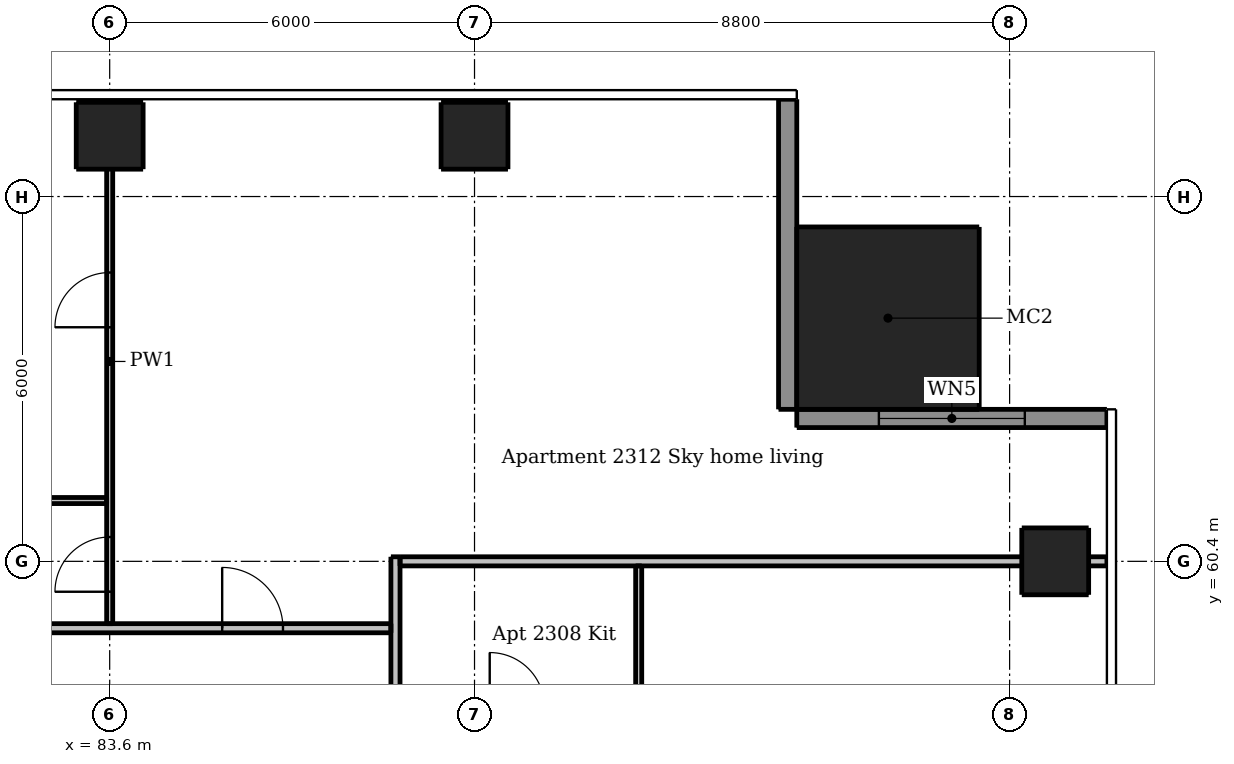
"""IFC4 building model, lengths in metres.
Left out: names, types, materials, properties, quantities, classifications, styles, units other than length and angle.
Written with IfcOpenShell. Run it as: python <this file> out.ifc"""

import sys

from ifc_helpers import new_model, si_unit, direction, frame, frame_2d, origin, origin_2d, place, context, subcontext, project, spatial, rectangle, extrude, element, fill, save


model = new_model("IFC4")
c1 = context("Model", 3, precision=1e-05, world=origin(), true_north=direction((0.0, 1.0)))
c2 = subcontext(c1, "Body", "Model", "MODEL_VIEW")
j1 = project(units=[si_unit("LENGTHUNIT", "METRE"), si_unit("PLANEANGLEUNIT", "RADIAN")], contexts=[c1])
p1 = place(None, origin())
s1 = spatial("IfcSite", under=j1, at=p1, CompositionType="ELEMENT")
p2 = place(p1, origin())
s2 = spatial("IfcBuilding", under=s1, at=p2, CompositionType="ELEMENT")
p3 = place(p2, frame((0.0, 0.0, 88.6)))
s3 = spatial("IfcBuildingStorey", under=s2, at=p3, CompositionType="ELEMENT", Elevation=88.6)
for number, where, z_axis, x_axis in (
    (1, (99.15, 60.4, 0.0), (0.0, 0.0, 1.0), (1.0, 0.0, 0.0)),
    (2, (83.6, 67.4, 0.0), (0.0, 0.0, 1.0), (1.0, 0.0, 0.0)),
    (3, (89.6, 67.4, 0.0), (0.0, 0.0, 1.0), (1.0, 0.0, 0.0)),
):
    element("IfcColumn", number, at=place(p3, frame(where, z_axis=z_axis, x_axis=x_axis)), inside=s3, PredefinedType="COLUMN", context=c2, shape_type="SweptSolid", body=[
        extrude(rectangle(XDim=1.1, YDim=1.1, at=origin_2d()), origin(), (0.0, 0.0, 1.0), 3.05),
    ])
p4 = place(p3, frame((96.4, 64.4, 0.0), z_axis=(0.0, 0.0, 1.0), x_axis=(1.0, 0.0, 0.0)))
e4 = element("IfcColumn", 4, at=p4, inside=s3, PredefinedType="COLUMN", context=c2, shape_type="SweptSolid", body=[
    extrude(rectangle(XDim=3.0, YDim=3.0, at=origin_2d()), origin(), (0.0, 0.0, 1.0), 3.3),
])
p5 = place(p3, frame((100.0, 62.75, 0.0), z_axis=(0.0, 0.0, 1.0), x_axis=(-1.0, 0.0, 0.0)))
e5 = element("IfcWall", 5, at=p5, inside=s3, PredefinedType="SOLIDWALL", context=c2, shape_type="SweptSolid", body=[
    extrude(rectangle(XDim=5.1, YDim=0.3, at=frame_2d((2.55, 0.0))), origin(), (0.0, 0.0, 1.0), 3.05),
])
p6 = place(p5, frame((1.35, 0.0, 0.15)))
e6 = element("IfcOpeningElement", 6, at=p6, cuts=e5, PredefinedType="OPENING", context=c2, shape_type="SweptSolid", body=[
    extrude(rectangle(XDim=2.4, YDim=2.1, at=frame_2d((1.2, 1.05))), frame((0.0, 0.16, 0.0), z_axis=(0.0, -1.0, 0.0), x_axis=(1.0, 0.0, 0.0)), (0.0, 0.0, 1.0), 0.32),
])
p7 = place(p3, frame((94.75, 62.9, 0.0), z_axis=(0.0, 0.0, 1.0), x_axis=(0.0, 1.0, 0.0)))
e7 = element("IfcWall", 7, at=p7, inside=s3, PredefinedType="SOLIDWALL", context=c2, shape_type="SweptSolid", body=[
    extrude(rectangle(XDim=5.1, YDim=0.3, at=frame_2d((2.55, 0.0))), origin(), (0.0, 0.0, 1.0), 3.05),
])
p8 = place(p3, frame((83.6, 59.375, 0.0), z_axis=(0.0, 0.0, 1.0), x_axis=(0.0, 1.0, 0.0)))
e8 = element("IfcWall", 8, at=p8, inside=s3, PredefinedType="PARTITIONING", context=c2, shape_type="SweptSolid", body=[
    extrude(rectangle(XDim=8.625, YDim=0.1, at=frame_2d((4.312, 0.0))), origin(), (0.0, 0.0, 1.0), 2.516),
])
p9 = place(p8, frame((0.525, 0.0, 0.0)))
e9 = element("IfcOpeningElement", 9, at=p9, cuts=e8, PredefinedType="OPENING", context=c2, shape_type="SweptSolid", body=[
    extrude(rectangle(XDim=0.9, YDim=2.1, at=frame_2d((0.45, 1.05))), frame((0.0, 0.06, 0.0), z_axis=(0.0, -1.0, 0.0), x_axis=(1.0, 0.0, 0.0)), (0.0, 0.0, 1.0), 0.12),
])
p10 = place(p8, frame((4.875, 0.0, 0.0)))
e10 = element("IfcOpeningElement", 10, at=p10, cuts=e8, PredefinedType="OPENING", context=c2, shape_type="SweptSolid", body=[
    extrude(rectangle(XDim=0.9, YDim=2.1, at=frame_2d((0.45, 1.05))), frame((0.0, 0.06, 0.0), z_axis=(0.0, -1.0, 0.0), x_axis=(1.0, 0.0, 0.0)), (0.0, 0.0, 1.0), 0.12),
])
p11 = place(p3, frame((92.3, 57.95, 0.0), z_axis=(0.0, 0.0, 1.0), x_axis=(0.0, 1.0, 0.0)))
e11 = element("IfcWall", 11, at=p11, inside=s3, PredefinedType="PARTITIONING", context=c2, shape_type="SweptSolid", body=[
    extrude(rectangle(XDim=2.375, YDim=0.1, at=frame_2d((1.188, 0.0))), origin(), (0.0, 0.0, 1.0), 3.05),
])
p12 = place(p3, frame((83.55, 61.4, 0.0), z_axis=(0.0, 0.0, 1.0), x_axis=(-1.0, 0.0, 0.0)))
e12 = element("IfcWall", 12, at=p12, inside=s3, PredefinedType="PARTITIONING", context=c2, shape_type="SweptSolid", body=[
    extrude(rectangle(XDim=8.0, YDim=0.1, at=frame_2d((4.0, 0.0))), origin(), (0.0, 0.0, 1.0), 3.05),
])
p13 = place(p12, frame((6.6, 0.0, 0.0)))
e13 = element("IfcOpeningElement", 13, at=p13, cuts=e12, PredefinedType="OPENING", context=c2, shape_type="SweptSolid", body=[
    extrude(rectangle(XDim=0.8, YDim=2.1, at=frame_2d((0.4, 1.05))), frame((0.0, 0.06, 0.0), z_axis=(0.0, -1.0, 0.0), x_axis=(1.0, 0.0, 0.0)), (0.0, 0.0, 1.0), 0.12),
])
p14 = place(p12, frame((3.75, 0.0, 0.0)))
e14 = element("IfcOpeningElement", 14, at=p14, cuts=e12, PredefinedType="OPENING", context=c2, shape_type="SweptSolid", body=[
    extrude(rectangle(XDim=0.8, YDim=2.1, at=frame_2d((0.4, 1.05))), frame((0.0, 0.06, 0.0), z_axis=(0.0, -1.0, 0.0), x_axis=(1.0, 0.0, 0.0)), (0.0, 0.0, 1.0), 0.12),
])
p15 = place(p3, frame((88.3, 60.475, 0.0), z_axis=(0.0, 0.0, 1.0), x_axis=(0.0, -1.0, 0.0)))
e15 = element("IfcWall", 15, at=p15, inside=s3, PredefinedType="PARTITIONING", context=c2, shape_type="SweptSolid", body=[
    extrude(rectangle(XDim=28.7, YDim=0.15, at=frame_2d((14.35, 0.0))), origin(), (0.0, 0.0, 1.0), 3.05),
])
p16 = place(p15, frame((27.425, 0.0, 0.0)))
e16 = element("IfcOpeningElement", 16, at=p16, cuts=e15, PredefinedType="OPENING", context=c2, shape_type="SweptSolid", body=[
    extrude(rectangle(XDim=1.0, YDim=2.1, at=frame_2d((0.5, 1.05))), frame((0.0, 0.085, 0.0), z_axis=(0.0, -1.0, 0.0), x_axis=(1.0, 0.0, 0.0)), (0.0, 0.0, 1.0), 0.17),
])
p17 = place(p15, frame((17.575, 0.0, 0.0)))
e17 = element("IfcOpeningElement", 17, at=p17, cuts=e15, PredefinedType="OPENING", context=c2, shape_type="SweptSolid", body=[
    extrude(rectangle(XDim=1.0, YDim=2.1, at=frame_2d((0.5, 1.05))), frame((0.0, 0.085, 0.0), z_axis=(0.0, -1.0, 0.0), x_axis=(1.0, 0.0, 0.0)), (0.0, 0.0, 1.0), 0.17),
])
p18 = place(p15, frame((11.575, 0.0, 0.0)))
e18 = element("IfcOpeningElement", 18, at=p18, cuts=e15, PredefinedType="OPENING", context=c2, shape_type="SweptSolid", body=[
    extrude(rectangle(XDim=1.0, YDim=2.1, at=frame_2d((0.5, 1.05))), frame((0.0, 0.085, 0.0), z_axis=(0.0, -1.0, 0.0), x_axis=(1.0, 0.0, 0.0)), (0.0, 0.0, 1.0), 0.17),
])
p19 = place(p15, frame((3.775, 0.0, 0.0)))
e19 = element("IfcOpeningElement", 19, at=p19, cuts=e15, PredefinedType="OPENING", context=c2, shape_type="SweptSolid", body=[
    extrude(rectangle(XDim=1.0, YDim=2.1, at=frame_2d((0.5, 1.05))), frame((0.0, 0.085, 0.0), z_axis=(0.0, -1.0, 0.0), x_axis=(1.0, 0.0, 0.0)), (0.0, 0.0, 1.0), 0.17),
])
p20 = place(p3, frame((88.375, 60.4, 0.0), z_axis=(0.0, 0.0, 1.0), x_axis=(1.0, 0.0, 0.0)))
e20 = element("IfcWall", 20, at=p20, inside=s3, PredefinedType="PARTITIONING", context=c2, shape_type="SweptSolid", body=[
    extrude(rectangle(XDim=11.625, YDim=0.15, at=frame_2d((5.812, 0.0))), origin(), (0.0, 0.0, 1.0), 2.516),
])
p21 = place(p3, frame((59.675, 59.3, 0.0), z_axis=(0.0, 0.0, 1.0), x_axis=(1.0, 0.0, 0.0)))
e21 = element("IfcWall", 21, at=p21, inside=s3, PredefinedType="PARTITIONING", context=c2, shape_type="SweptSolid", body=[
    extrude(rectangle(XDim=28.55, YDim=0.15, at=frame_2d((14.275, 0.0))), origin(), (0.0, 0.0, 1.0), 3.05),
])
p22 = place(p21, frame((2.425, 0.0, 0.0)))
e22 = element("IfcOpeningElement", 22, at=p22, cuts=e21, PredefinedType="OPENING", context=c2, shape_type="SweptSolid", body=[
    extrude(rectangle(XDim=1.0, YDim=2.1, at=frame_2d((0.5, 1.05))), frame((0.0, 0.085, 0.0), z_axis=(0.0, -1.0, 0.0), x_axis=(1.0, 0.0, 0.0)), (0.0, 0.0, 1.0), 0.17),
])
p23 = place(p21, frame((8.425, 0.0, 0.0)))
e23 = element("IfcOpeningElement", 23, at=p23, cuts=e21, PredefinedType="OPENING", context=c2, shape_type="SweptSolid", body=[
    extrude(rectangle(XDim=1.0, YDim=2.1, at=frame_2d((0.5, 1.05))), frame((0.0, 0.085, 0.0), z_axis=(0.0, -1.0, 0.0), x_axis=(1.0, 0.0, 0.0)), (0.0, 0.0, 1.0), 0.17),
])
p24 = place(p21, frame((14.425, 0.0, 0.0)))
e24 = element("IfcOpeningElement", 24, at=p24, cuts=e21, PredefinedType="OPENING", context=c2, shape_type="SweptSolid", body=[
    extrude(rectangle(XDim=1.0, YDim=2.1, at=frame_2d((0.5, 1.05))), frame((0.0, 0.085, 0.0), z_axis=(0.0, -1.0, 0.0), x_axis=(1.0, 0.0, 0.0)), (0.0, 0.0, 1.0), 0.17),
])
p25 = place(p21, frame((25.775, 0.0, 0.0)))
e25 = element("IfcOpeningElement", 25, at=p25, cuts=e21, PredefinedType="OPENING", context=c2, shape_type="SweptSolid", body=[
    extrude(rectangle(XDim=1.0, YDim=2.1, at=frame_2d((0.5, 1.05))), frame((0.0, 0.085, 0.0), z_axis=(0.0, -1.0, 0.0), x_axis=(1.0, 0.0, 0.0)), (0.0, 0.0, 1.0), 0.17),
])
p26 = place(p6, origin())
e26 = element("IfcWindow", 26, at=p26, inside=s3, PartitioningType="DOUBLE_PANEL_VERTICAL", PredefinedType="WINDOW", context=c2, shape_type="SweptSolid", body=[
    extrude(rectangle(XDim=2.4, YDim=2.1, at=frame_2d((1.2, 1.05))), frame((0.0, 0.03, 0.0), z_axis=(0.0, -1.0, 0.0), x_axis=(1.0, 0.0, 0.0)), (0.0, 0.0, 1.0), 0.06),
])
fill(e6, e26)
p27 = place(p25, origin())
e27 = element("IfcDoor", 27, at=p27, inside=s3, OperationType="SINGLE_SWING_LEFT", PredefinedType="DOOR", context=c2, shape_type="SweptSolid", body=[
    extrude(rectangle(XDim=1.0, YDim=2.1, at=frame_2d((0.5, 1.05))), frame((0.0, 0.025, 0.0), z_axis=(0.0, -1.0, 0.0), x_axis=(1.0, 0.0, 0.0)), (0.0, 0.0, 1.0), 0.05),
])
fill(e25, e27)
p28 = place(p9, origin())
e28 = element("IfcDoor", 28, at=p28, inside=s3, OperationType="SINGLE_SWING_LEFT", PredefinedType="DOOR", context=c2, shape_type="SweptSolid", body=[
    extrude(rectangle(XDim=0.9, YDim=2.1, at=frame_2d((0.45, 1.05))), frame((0.0, 0.025, 0.0), z_axis=(0.0, -1.0, 0.0), x_axis=(1.0, 0.0, 0.0)), (0.0, 0.0, 1.0), 0.05),
])
fill(e9, e28)
p29 = place(p10, origin())
e29 = element("IfcDoor", 29, at=p29, inside=s3, OperationType="SINGLE_SWING_LEFT", PredefinedType="DOOR", context=c2, shape_type="SweptSolid", body=[
    extrude(rectangle(XDim=0.9, YDim=2.1, at=frame_2d((0.45, 1.05))), frame((0.0, 0.025, 0.0), z_axis=(0.0, -1.0, 0.0), x_axis=(1.0, 0.0, 0.0)), (0.0, 0.0, 1.0), 0.05),
])
fill(e10, e29)
save(model, sys.argv[1])
